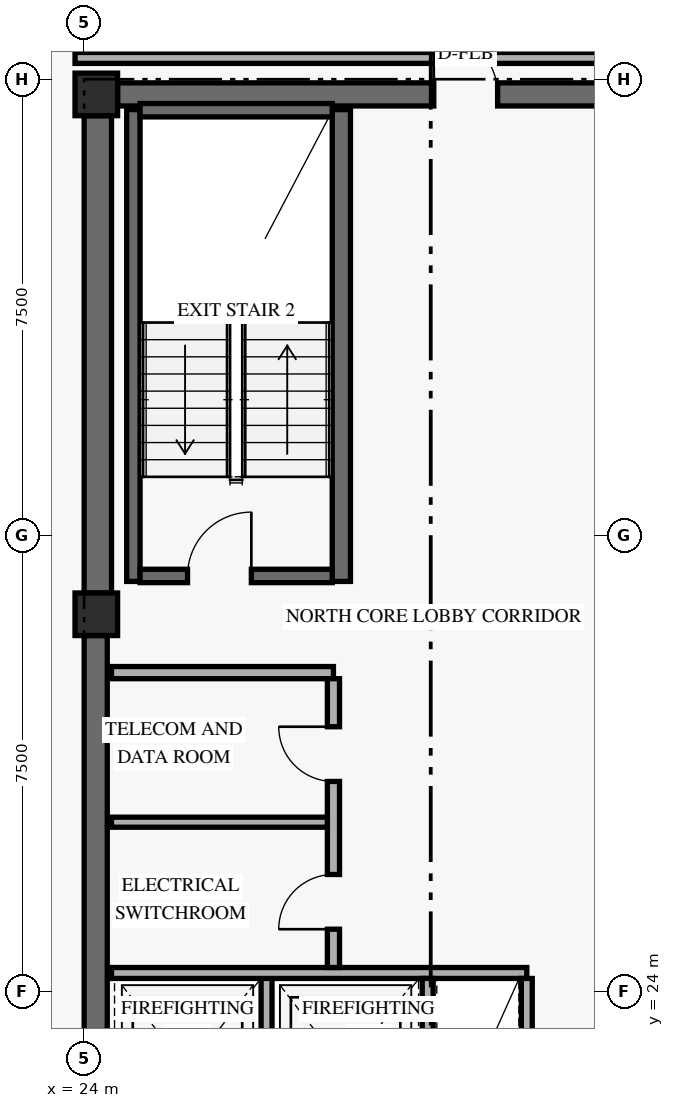
"""IFC4 building model, lengths in metres.
Left out: names, types, materials, properties, quantities, classifications, styles, units other than length and angle.
Written with IfcOpenShell. Run it as: python <this file> out.ifc"""

import sys

from ifc_helpers import new_model, si_unit, direction, frame, frame_2d, origin, origin_2d, place, context, subcontext, project, spatial, rectangle, extrude, element, fill, save


model = new_model("IFC4")
c1 = context("Model", 3, precision=1e-05, world=origin(), true_north=direction((0.0, 1.0)))
c2 = subcontext(c1, "Body", "Model", "MODEL_VIEW")
j1 = project(units=[si_unit("LENGTHUNIT", "METRE"), si_unit("PLANEANGLEUNIT", "RADIAN")], contexts=[c1])
p1 = place(None, origin())
s1 = spatial("IfcSite", under=j1, at=p1, CompositionType="ELEMENT")
p2 = place(p1, origin())
s2 = spatial("IfcBuilding", under=s1, at=p2, CompositionType="ELEMENT")
p3 = place(p2, frame((0.0, 0.0, 148.2)))
s3 = spatial("IfcBuildingStorey", under=s2, at=p3, CompositionType="ELEMENT", Elevation=148.2)
p4 = place(p3, frame((24.19, 17.9, 0.0), z_axis=(0.0, 0.0, 1.0), x_axis=(0.0, 1.0, 0.0)))
e1 = element("IfcWall", 1, at=p4, inside=s3, PredefinedType="SHEAR", context=c2, shape_type="SweptSolid", body=[
    extrude(rectangle(XDim=11.95, YDim=0.38, at=frame_2d((5.975, 0.0))), origin(), (0.0, 0.0, 1.0), 2.748),
])
p5 = place(p3, frame((24.225, 30.55, 0.0), z_axis=(0.0, 0.0, 1.0), x_axis=(0.0, 1.0, 0.0)))
e2 = element("IfcWall", 2, at=p5, inside=s3, PredefinedType="SHEAR", context=c2, shape_type="SweptSolid", body=[
    extrude(rectangle(XDim=7.85, YDim=0.45, at=frame_2d((3.925, 0.0))), origin(), (0.0, 0.0, 1.0), 2.748),
])
p6 = place(p3, frame((24.55, 38.75, 0.0), z_axis=(0.0, 0.0, 1.0), x_axis=(1.0, 0.0, 0.0)))
e3 = element("IfcWall", 3, at=p6, inside=s3, PredefinedType="SHEAR", context=c2, shape_type="SweptSolid", body=[
    extrude(rectangle(XDim=10.3, YDim=0.38, at=frame_2d((5.15, 0.0))), origin(), (0.0, 0.0, 1.0), 3.36),
])
p7 = place(p6, frame((5.2, 0.0, 0.0)))
e4 = element("IfcOpeningElement", 4, at=p7, cuts=e3, PredefinedType="OPENING", context=c2, shape_type="SweptSolid", body=[
    extrude(rectangle(XDim=1.05, YDim=2.15, at=frame_2d((0.525, 1.075))), frame((0.0, 0.2, 0.0), z_axis=(0.0, -1.0, 0.0), x_axis=(1.0, 0.0, 0.0)), (0.0, 0.0, 1.0), 0.4),
])
p8 = place(p3, frame((24.81, 30.74, 0.0), z_axis=(0.0, 0.0, 1.0), x_axis=(0.0, 1.0, 0.0)))
e5 = element("IfcWall", 5, at=p8, inside=s3, PredefinedType="SHEAR", context=c2, shape_type="SweptSolid", body=[
    extrude(rectangle(XDim=7.76, YDim=0.22, at=frame_2d((3.88, 0.0))), origin(), (0.0, 0.0, 1.0), 3.36),
])
p9 = place(p3, frame((28.23, 30.74, 0.0), z_axis=(0.0, 0.0, 1.0), x_axis=(0.0, 1.0, 0.0)))
e6 = element("IfcWall", 6, at=p9, inside=s3, PredefinedType="SHEAR", context=c2, shape_type="SweptSolid", body=[
    extrude(rectangle(XDim=7.76, YDim=0.3, at=frame_2d((3.88, 0.0))), origin(), (0.0, 0.0, 1.0), 3.36),
])
p10 = place(p3, frame((24.92, 30.83, 0.0), z_axis=(0.0, 0.0, 1.0), x_axis=(1.0, 0.0, 0.0)))
e7 = element("IfcWall", 7, at=p10, inside=s3, PredefinedType="SHEAR", context=c2, shape_type="SweptSolid", body=[
    extrude(rectangle(XDim=3.16, YDim=0.22, at=frame_2d((1.58, 0.0))), origin(), (0.0, 0.0, 1.0), 3.36),
])
p11 = place(p10, frame((0.78, 0.0, 0.0)))
e8 = element("IfcOpeningElement", 8, at=p11, cuts=e7, PredefinedType="OPENING", context=c2, shape_type="SweptSolid", body=[
    extrude(rectangle(XDim=1.05, YDim=2.15, at=frame_2d((0.525, 1.075))), frame((0.0, 0.12, 0.0), z_axis=(0.0, -1.0, 0.0), x_axis=(1.0, 0.0, 0.0)), (0.0, 0.0, 1.0), 0.24),
])
p12 = place(p3, frame((24.92, 38.49, 0.0), z_axis=(0.0, 0.0, 1.0), x_axis=(1.0, 0.0, 0.0)))
e9 = element("IfcWall", 9, at=p12, inside=s3, PredefinedType="SHEAR", context=c2, shape_type="SweptSolid", body=[
    extrude(rectangle(XDim=3.16, YDim=0.22, at=frame_2d((1.58, 0.0))), origin(), (0.0, 0.0, 1.0), 3.36),
])
for number, where, z_axis, x_axis in (
    (10, (24.2, 30.2, 0.0), (0.0, 0.0, 1.0), (1.0, 0.0, 0.0)),
    (11, (24.2, 38.75, 0.0), (0.0, 0.0, 1.0), (1.0, 0.0, 0.0)),
):
    element("IfcColumn", number, at=place(p3, frame(where, z_axis=z_axis, x_axis=x_axis)), inside=s3, PredefinedType="COLUMN", context=c2, shape_type="SweptSolid", body=[
        extrude(rectangle(XDim=0.7, YDim=0.7, at=origin_2d()), origin(), (0.0, 0.0, 1.0), 3.6),
    ])
p13 = place(p3, frame((27.0, 21.19, 0.0), z_axis=(0.0, 0.0, 1.0), x_axis=(0.0, 1.0, 0.0)))
e12 = element("IfcWall", 12, at=p13, inside=s3, PredefinedType="STANDARD", context=c2, shape_type="SweptSolid", body=[
    extrude(rectangle(XDim=3.11, YDim=0.18, at=frame_2d((1.555, 0.0))), origin(), (0.0, 0.0, 1.0), 3.36),
])
p14 = place(p3, frame((24.45, 24.3, 0.0), z_axis=(0.0, 0.0, 1.0), x_axis=(1.0, 0.0, 0.0)))
e13 = element("IfcWall", 13, at=p14, inside=s3, PredefinedType="STANDARD", context=c2, shape_type="SweptSolid", body=[
    extrude(rectangle(XDim=6.83, YDim=0.18, at=frame_2d((3.415, 0.0))), origin(), (0.0, 0.0, 1.0), 3.36),
])
for number, where, z_axis, x_axis in (
    (14, (29.65, 21.19, 0.0), (0.0, 0.0, 1.0), (0.0, 1.0, 0.0)),
    (15, (31.28, 21.19, 0.0), (0.0, 0.0, 1.0), (0.0, 1.0, 0.0)),
):
    element("IfcWall", number, at=place(p3, frame(where, z_axis=z_axis, x_axis=x_axis)), inside=s3, PredefinedType="STANDARD", context=c2, shape_type="SweptSolid", body=[
        extrude(rectangle(XDim=3.02, YDim=0.18, at=frame_2d((1.51, 0.0))), origin(), (0.0, 0.0, 1.0), 3.36),
    ])
p15 = place(p3, frame((24.45, 29.24, 0.0), z_axis=(0.0, 0.0, 1.0), x_axis=(1.0, 0.0, 0.0)))
e16 = element("IfcWall", 16, at=p15, inside=s3, PredefinedType="STANDARD", context=c2, shape_type="SweptSolid", body=[
    extrude(rectangle(XDim=3.65, YDim=0.2, at=frame_2d((1.825, 0.0))), origin(), (0.0, 0.0, 1.0), 3.36),
])
p16 = place(p3, frame((28.1, 24.39, 0.0), z_axis=(0.0, 0.0, 1.0), x_axis=(0.0, 1.0, 0.0)))
e17 = element("IfcWall", 17, at=p16, inside=s3, PredefinedType="STANDARD", context=c2, shape_type="SweptSolid", body=[
    extrude(rectangle(XDim=4.75, YDim=0.2, at=frame_2d((2.375, 0.0))), origin(), (0.0, 0.0, 1.0), 3.36),
])
p17 = place(p16, frame((0.63, 0.0, 0.0)))
e18 = element("IfcOpeningElement", 18, at=p17, cuts=e17, PredefinedType="OPENING", context=c2, shape_type="SweptSolid", body=[
    extrude(rectangle(XDim=0.9, YDim=2.1, at=frame_2d((0.45, 1.05))), frame((0.0, 0.11, 0.0), z_axis=(0.0, -1.0, 0.0), x_axis=(1.0, 0.0, 0.0)), (0.0, 0.0, 1.0), 0.22),
])
p18 = place(p16, frame((3.06, 0.0, 0.0)))
e19 = element("IfcOpeningElement", 19, at=p18, cuts=e17, PredefinedType="OPENING", context=c2, shape_type="SweptSolid", body=[
    extrude(rectangle(XDim=0.9, YDim=2.1, at=frame_2d((0.45, 1.05))), frame((0.0, 0.11, 0.0), z_axis=(0.0, -1.0, 0.0), x_axis=(1.0, 0.0, 0.0)), (0.0, 0.0, 1.0), 0.22),
])
p19 = place(p3, frame((24.45, 26.78, 0.0), z_axis=(0.0, 0.0, 1.0), x_axis=(1.0, 0.0, 0.0)))
e20 = element("IfcWall", 20, at=p19, inside=s3, PredefinedType="PARTITIONING", context=c2, shape_type="SweptSolid", body=[
    extrude(rectangle(XDim=3.55, YDim=0.165, at=frame_2d((1.775, 0.0))), origin(), (0.0, 0.0, 1.0), 3.36),
])
p20 = place(p3, frame((23.85, 39.35, 0.0), z_axis=(0.0, 0.0, 1.0), x_axis=(1.0, 0.0, 0.0)))
e21 = element("IfcWall", 21, at=p20, inside=s3, PredefinedType="STANDARD", context=c2, shape_type="SweptSolid", body=[
    extrude(rectangle(XDim=11.57, YDim=0.18, at=frame_2d((5.785, 0.0))), origin(), (0.0, 0.0, 1.0), 2.73),
])
p21 = place(p11, origin())
e22 = element("IfcDoor", 22, at=p21, inside=s3, OperationType="SINGLE_SWING_RIGHT", PredefinedType="DOOR", context=c2, shape_type="SweptSolid", body=[
    extrude(rectangle(XDim=1.05, YDim=2.15, at=frame_2d((0.525, 1.075))), frame((0.0, 0.025, 0.0), z_axis=(0.0, -1.0, 0.0), x_axis=(1.0, 0.0, 0.0)), (0.0, 0.0, 1.0), 0.05),
])
fill(e8, e22)
p22 = place(p17, origin())
e23 = element("IfcDoor", 23, at=p22, inside=s3, OperationType="SINGLE_SWING_LEFT", PredefinedType="DOOR", context=c2, shape_type="SweptSolid", body=[
    extrude(rectangle(XDim=0.9, YDim=2.1, at=frame_2d((0.45, 1.05))), frame((0.0, 0.025, 0.0), z_axis=(0.0, -1.0, 0.0), x_axis=(1.0, 0.0, 0.0)), (0.0, 0.0, 1.0), 0.05),
])
fill(e18, e23)
p23 = place(p18, origin())
e24 = element("IfcDoor", 24, at=p23, inside=s3, OperationType="SINGLE_SWING_RIGHT", PredefinedType="DOOR", context=c2, shape_type="SweptSolid", body=[
    extrude(rectangle(XDim=0.9, YDim=2.1, at=frame_2d((0.45, 1.05))), frame((0.0, 0.025, 0.0), z_axis=(0.0, -1.0, 0.0), x_axis=(1.0, 0.0, 0.0)), (0.0, 0.0, 1.0), 0.05),
])
fill(e19, e24)
p24 = place(p7, frame((1.05, 0.0, 0.0), z_axis=(0.0, 0.0, 1.0), x_axis=(-1.0, 0.0, 0.0)))
e25 = element("IfcDoor", 25, at=p24, inside=s3, OperationType="SINGLE_SWING_RIGHT", PredefinedType="DOOR", context=c2, shape_type="SweptSolid", body=[
    extrude(rectangle(XDim=1.05, YDim=2.15, at=frame_2d((0.525, 1.075))), frame((0.0, 0.025, 0.0), z_axis=(0.0, -1.0, 0.0), x_axis=(1.0, 0.0, 0.0)), (0.0, 0.0, 1.0), 0.05),
])
fill(e4, e25)
save(model, sys.argv[1])
